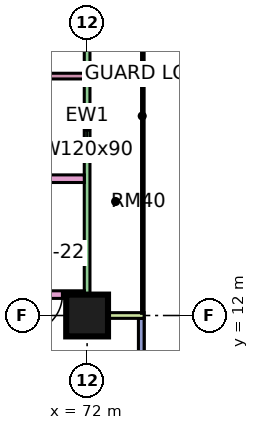
"""IFC4 building model, lengths in metres.
Left out: names, types, materials, properties, quantities, classifications, styles, units other than length and angle.
Written with IfcOpenShell. Run it as: python <this file> out.ifc"""

import sys

from ifc_helpers import new_model, si_unit, direction, frame, frame_2d, origin, origin_2d, place, context, subcontext, project, spatial, rectangle, extrude, element, fill, save


model = new_model("IFC4")
c1 = context("Model", 3, precision=1e-05, world=origin(), true_north=direction((0.0, 1.0)))
c2 = subcontext(c1, "Body", "Model", "MODEL_VIEW")
j1 = project(units=[si_unit("LENGTHUNIT", "METRE"), si_unit("PLANEANGLEUNIT", "RADIAN")], contexts=[c1])
p1 = place(None, origin())
s1 = spatial("IfcSite", under=j1, at=p1, CompositionType="ELEMENT")
p2 = place(p1, origin())
s2 = spatial("IfcBuilding", under=s1, at=p2, CompositionType="ELEMENT")
p3 = place(p2, frame((0.0, 0.0, 56.4)))
s3 = spatial("IfcBuildingStorey", under=s2, at=p3, CompositionType="ELEMENT", Elevation=56.4)
p4 = place(p3, frame((72.0, 12.0, 0.0), z_axis=(0.0, 0.0, 1.0), x_axis=(1.0, 0.0, 0.0)))
e1 = element("IfcColumn", 1, at=p4, inside=s3, PredefinedType="COLUMN", context=c2, shape_type="SweptSolid", body=[
    extrude(rectangle(XDim=1.1, YDim=1.1, at=origin_2d()), origin(), (0.0, 0.0, 1.0), 3.75),
])
p5 = place(p3, frame((73.425, 1.5, 0.0), z_axis=(0.0, 0.0, 1.0), x_axis=(0.0, 1.0, 0.0)))
e2 = element("IfcWall", 2, at=p5, inside=s3, PredefinedType="SOLIDWALL", context=c2, shape_type="SweptSolid", body=[
    extrude(rectangle(XDim=10.425, YDim=0.15, at=frame_2d((5.212, 0.0))), origin(), (0.0, 0.0, 1.0), 3.35),
])
p6 = place(p5, frame((1.025, 0.0, 0.45)))
e3 = element("IfcOpeningElement", 3, at=p6, cuts=e2, PredefinedType="OPENING", context=c2, shape_type="SweptSolid", body=[
    extrude(rectangle(XDim=3.0, YDim=2.4, at=frame_2d((1.5, 1.2))), frame((0.0, 0.085, 0.0), z_axis=(0.0, -1.0, 0.0), x_axis=(1.0, 0.0, 0.0)), (0.0, 0.0, 1.0), 0.17),
])
p7 = place(p5, frame((6.238, 0.0, 0.45)))
e4 = element("IfcOpeningElement", 4, at=p7, cuts=e2, PredefinedType="OPENING", context=c2, shape_type="SweptSolid", body=[
    extrude(rectangle(XDim=3.0, YDim=2.4, at=frame_2d((1.5, 1.2))), frame((0.0, 0.085, 0.0), z_axis=(0.0, -1.0, 0.0), x_axis=(1.0, 0.0, 0.0)), (0.0, 0.0, 1.0), 0.17),
])
p8 = place(p3, frame((72.0, 12.075, 0.0), z_axis=(0.0, 0.0, 1.0), x_axis=(0.0, 1.0, 0.0)))
e5 = element("IfcWall", 5, at=p8, inside=s3, PredefinedType="SOLIDWALL", context=c2, shape_type="SweptSolid", body=[
    extrude(rectangle(XDim=10.35, YDim=0.15, at=frame_2d((5.175, 0.0))), origin(), (0.0, 0.0, 1.0), 3.35),
])
p9 = place(p8, frame((4.275, 0.0, 1.7)))
e6 = element("IfcOpeningElement", 6, at=p9, cuts=e5, PredefinedType="OPENING", context=c2, shape_type="SweptSolid", body=[
    extrude(rectangle(XDim=1.2, YDim=0.9, at=frame_2d((0.6, 0.45))), frame((0.0, 0.085, 0.0), z_axis=(0.0, -1.0, 0.0), x_axis=(1.0, 0.0, 0.0)), (0.0, 0.0, 1.0), 0.17),
])
p10 = place(p8, frame((7.988, 0.0, 0.45)))
e7 = element("IfcOpeningElement", 7, at=p10, cuts=e5, PredefinedType="OPENING", context=c2, shape_type="SweptSolid", body=[
    extrude(rectangle(XDim=1.8, YDim=2.4, at=frame_2d((0.9, 1.2))), frame((0.0, 0.085, 0.0), z_axis=(0.0, -1.0, 0.0), x_axis=(1.0, 0.0, 0.0)), (0.0, 0.0, 1.0), 0.17),
])
p11 = place(p3, frame((73.5, 12.0, 0.0), z_axis=(0.0, 0.0, 1.0), x_axis=(-1.0, 0.0, 0.0)))
e8 = element("IfcWall", 8, at=p11, inside=s3, PredefinedType="SOLIDWALL", context=c2, shape_type="SweptSolid", body=[
    extrude(rectangle(XDim=1.5, YDim=0.15, at=frame_2d((0.75, 0.0))), origin(), (0.0, 0.0, 1.0), 3.35),
])
p12 = place(p3, frame((40.65, 12.55, 0.0), z_axis=(0.0, 0.0, 1.0), x_axis=(1.0, 0.0, 0.0)))
e9 = element("IfcWall", 9, at=p12, inside=s3, PredefinedType="PARTITIONING", context=c2, shape_type="SweptSolid", body=[
    extrude(rectangle(XDim=31.276, YDim=0.2, at=frame_2d((15.638, 0.0))), origin(), (0.0, 0.0, 1.0), 3.35),
])
p13 = place(p12, frame((8.4, 0.0, 0.0)))
e10 = element("IfcOpeningElement", 10, at=p13, cuts=e9, PredefinedType="OPENING", context=c2, shape_type="SweptSolid", body=[
    extrude(rectangle(XDim=1.0, YDim=2.1, at=frame_2d((0.5, 1.05))), frame((0.0, 0.11, 0.0), z_axis=(0.0, -1.0, 0.0), x_axis=(1.0, 0.0, 0.0)), (0.0, 0.0, 1.0), 0.22),
])
p14 = place(p12, frame((29.7, 0.0, 0.0)))
e11 = element("IfcOpeningElement", 11, at=p14, cuts=e9, PredefinedType="OPENING", context=c2, shape_type="SweptSolid", body=[
    extrude(rectangle(XDim=1.0, YDim=2.1, at=frame_2d((0.5, 1.05))), frame((0.0, 0.11, 0.0), z_axis=(0.0, -1.0, 0.0), x_axis=(1.0, 0.0, 0.0)), (0.0, 0.0, 1.0), 0.22),
])
p15 = place(p12, frame((1.05, 0.0, 0.0)))
e12 = element("IfcOpeningElement", 12, at=p15, cuts=e9, PredefinedType="OPENING", context=c2, shape_type="SweptSolid", body=[
    extrude(rectangle(XDim=1.0, YDim=2.1, at=frame_2d((0.5, 1.05))), frame((0.0, 0.11, 0.0), z_axis=(0.0, -1.0, 0.0), x_axis=(1.0, 0.0, 0.0)), (0.0, 0.0, 1.0), 0.22),
])
p16 = place(p3, frame((51.225, 15.6, 0.0), z_axis=(0.0, 0.0, 1.0), x_axis=(1.0, 0.0, 0.0)))
e13 = element("IfcWall", 13, at=p16, inside=s3, PredefinedType="PARTITIONING", context=c2, shape_type="SweptSolid", body=[
    extrude(rectangle(XDim=20.701, YDim=0.2, at=frame_2d((10.351, 0.0))), origin(), (0.0, 0.0, 1.0), 3.35),
])
p17 = place(p16, frame((12.575, 0.0, 0.0)))
e14 = element("IfcOpeningElement", 14, at=p17, cuts=e13, PredefinedType="OPENING", context=c2, shape_type="SweptSolid", body=[
    extrude(rectangle(XDim=1.0, YDim=2.1, at=frame_2d((0.5, 1.05))), frame((0.0, 0.11, 0.0), z_axis=(0.0, -1.0, 0.0), x_axis=(1.0, 0.0, 0.0)), (0.0, 0.0, 1.0), 0.22),
])
p18 = place(p16, frame((0.875, 0.0, 0.0)))
e15 = element("IfcOpeningElement", 15, at=p18, cuts=e13, PredefinedType="OPENING", context=c2, shape_type="SweptSolid", body=[
    extrude(rectangle(XDim=1.0, YDim=2.1, at=frame_2d((0.5, 1.05))), frame((0.0, 0.11, 0.0), z_axis=(0.0, -1.0, 0.0), x_axis=(1.0, 0.0, 0.0)), (0.0, 0.0, 1.0), 0.22),
])
p19 = place(p3, frame((65.625, 18.3, 0.0), z_axis=(0.0, 0.0, 1.0), x_axis=(1.0, 0.0, 0.0)))
e16 = element("IfcWall", 16, at=p19, inside=s3, PredefinedType="PARTITIONING", context=c2, shape_type="SweptSolid", body=[
    extrude(rectangle(XDim=6.301, YDim=0.15, at=frame_2d((3.15, 0.0))), origin(), (0.0, 0.0, 1.0), 3.35),
])
p20 = place(p19, frame((1.425, 0.0, 0.0)))
e17 = element("IfcOpeningElement", 17, at=p20, cuts=e16, PredefinedType="OPENING", context=c2, shape_type="SweptSolid", body=[
    extrude(rectangle(XDim=0.8, YDim=2.1, at=frame_2d((0.4, 1.05))), frame((0.0, 0.085, 0.0), z_axis=(0.0, -1.0, 0.0), x_axis=(1.0, 0.0, 0.0)), (0.0, 0.0, 1.0), 0.17),
])
p21 = place(p19, frame((4.575, 0.0, 0.0)))
e18 = element("IfcOpeningElement", 18, at=p21, cuts=e16, PredefinedType="OPENING", context=c2, shape_type="SweptSolid", body=[
    extrude(rectangle(XDim=0.8, YDim=2.1, at=frame_2d((0.4, 1.05))), frame((0.0, 0.085, 0.0), z_axis=(0.0, -1.0, 0.0), x_axis=(1.0, 0.0, 0.0)), (0.0, 0.0, 1.0), 0.17),
])
p22 = place(p9, origin())
e19 = element("IfcWindow", 19, at=p22, inside=s3, PartitioningType="SINGLE_PANEL", PredefinedType="WINDOW", context=c2, shape_type="SweptSolid", body=[
    extrude(rectangle(XDim=1.2, YDim=0.9, at=frame_2d((0.6, 0.45))), frame((0.0, 0.03, 0.0), z_axis=(0.0, -1.0, 0.0), x_axis=(1.0, 0.0, 0.0)), (0.0, 0.0, 1.0), 0.06),
])
fill(e6, e19)
p23 = place(p14, frame((1.0, 0.0, 0.0), z_axis=(0.0, 0.0, 1.0), x_axis=(-1.0, 0.0, 0.0)))
e20 = element("IfcDoor", 20, at=p23, inside=s3, OperationType="SINGLE_SWING_LEFT", PredefinedType="DOOR", context=c2, shape_type="SweptSolid", body=[
    extrude(rectangle(XDim=1.0, YDim=2.1, at=frame_2d((0.5, 1.05))), frame((0.0, 0.025, 0.0), z_axis=(0.0, -1.0, 0.0), x_axis=(1.0, 0.0, 0.0)), (0.0, 0.0, 1.0), 0.05),
])
fill(e11, e20)
save(model, sys.argv[1])
